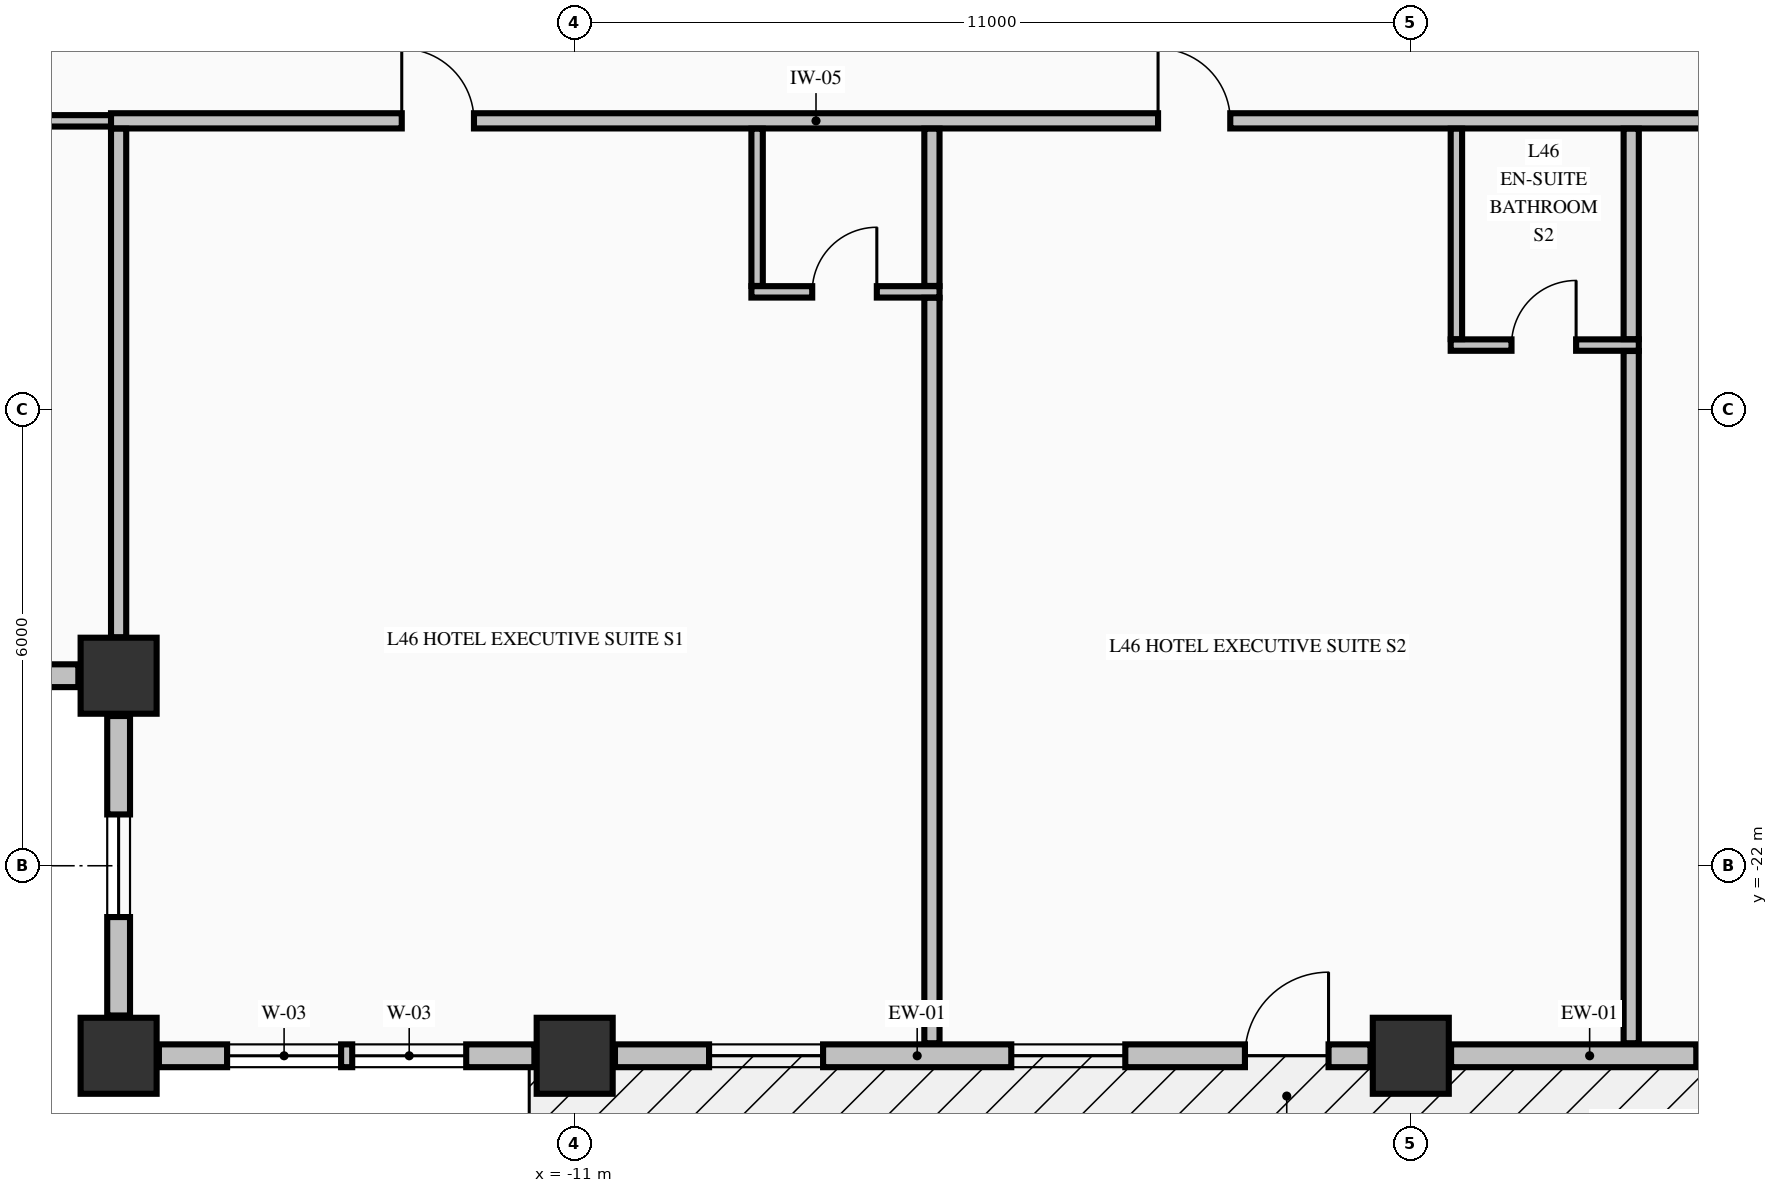
"""IFC4 building model, lengths in metres.
Left out: names, types, materials, properties, quantities, classifications, styles, units other than length and angle.
Written with IfcOpenShell. Run it as: python <this file> out.ifc"""

import sys

from ifc_helpers import new_model, si_unit, direction, frame, frame_2d, origin, origin_2d, place, context, subcontext, project, spatial, rectangle, extrude, element, fill, save


model = new_model("IFC4")
c1 = context("Model", 3, precision=1e-05, world=origin(), true_north=direction((0.0, 1.0)))
c2 = subcontext(c1, "Body", "Model", "MODEL_VIEW")
j1 = project(units=[si_unit("LENGTHUNIT", "METRE"), si_unit("PLANEANGLEUNIT", "RADIAN")], contexts=[c1])
p1 = place(None, origin())
s1 = spatial("IfcSite", under=j1, at=p1, CompositionType="ELEMENT")
p2 = place(p1, origin())
s2 = spatial("IfcBuilding", under=s1, at=p2, CompositionType="ELEMENT")
p3 = place(p2, frame((0.0, 0.0, 179.66)))
s3 = spatial("IfcBuildingStorey", under=s2, at=p3, CompositionType="ELEMENT", Elevation=179.66)
for number, where, z_axis, x_axis in (
    (1, (-17.0, -24.5, -0.25), (0.0, 0.0, 1.0), (1.0, 0.0, 0.0)),
    (2, (-11.0, -24.5, -0.25), (0.0, 0.0, 1.0), (1.0, 0.0, 0.0)),
    (3, (0.0, -24.5, -0.25), (0.0, 0.0, 1.0), (1.0, 0.0, 0.0)),
    (4, (-17.0, -19.5, -0.25), (0.0, 0.0, 1.0), (1.0, 0.0, 0.0)),
):
    element("IfcColumn", number, at=place(p3, frame(where, z_axis=z_axis, x_axis=x_axis)), inside=s3, PredefinedType="COLUMN", context=c2, shape_type="SweptSolid", body=[
        extrude(rectangle(XDim=1.0, YDim=1.0, at=origin_2d()), origin(), (0.0, 0.0, 1.0), 3.4),
    ])
p4 = place(p3, frame((-21.47, -19.5, 0.0), z_axis=(0.0, 0.0, 1.0), x_axis=(1.0, 0.0, 0.0)))
e5 = element("IfcWall", 5, at=p4, inside=s3, PredefinedType="STANDARD", context=c2, shape_type="SweptSolid", body=[
    extrude(rectangle(XDim=3.94, YDim=0.3, at=frame_2d((1.97, 0.0))), origin(), (0.0, 0.0, 1.0), 2.542),
])
p5 = place(p4, frame((1.295, 0.0, 0.68)))
e6 = element("IfcOpeningElement", 6, at=p5, cuts=e5, PredefinedType="OPENING", context=c2, shape_type="SweptSolid", body=[
    extrude(rectangle(XDim=1.35, YDim=1.42, at=frame_2d((0.675, 0.71))), frame((0.0, 0.16, 0.0), z_axis=(0.0, -1.0, 0.0), x_axis=(1.0, 0.0, 0.0)), (0.0, 0.0, 1.0), 0.32),
])
p6 = place(p3, frame((-17.0, -20.03, 0.0), z_axis=(0.0, 0.0, 1.0), x_axis=(0.0, -1.0, 0.0)))
e7 = element("IfcWall", 7, at=p6, inside=s3, PredefinedType="STANDARD", context=c2, shape_type="SweptSolid", body=[
    extrude(rectangle(XDim=3.94, YDim=0.3, at=frame_2d((1.97, 0.0))), origin(), (0.0, 0.0, 1.0), 2.542),
])
p7 = place(p6, frame((1.295, 0.0, 0.68)))
e8 = element("IfcOpeningElement", 8, at=p7, cuts=e7, PredefinedType="OPENING", context=c2, shape_type="SweptSolid", body=[
    extrude(rectangle(XDim=1.35, YDim=1.42, at=frame_2d((0.675, 0.71))), frame((0.0, 0.16, 0.0), z_axis=(0.0, -1.0, 0.0), x_axis=(1.0, 0.0, 0.0)), (0.0, 0.0, 1.0), 0.32),
])
p8 = place(p3, frame((-16.47, -24.5, 0.0), z_axis=(0.0, 0.0, 1.0), x_axis=(1.0, 0.0, 0.0)))
e9 = element("IfcWall", 9, at=p8, inside=s3, PredefinedType="STANDARD", context=c2, shape_type="SweptSolid", body=[
    extrude(rectangle(XDim=4.94, YDim=0.3, at=frame_2d((2.47, 0.0))), origin(), (0.0, 0.0, 1.0), 2.542),
])
p9 = place(p8, frame((0.897, 0.0, 0.72)))
e10 = element("IfcOpeningElement", 10, at=p9, cuts=e9, PredefinedType="OPENING", context=c2, shape_type="SweptSolid", body=[
    extrude(rectangle(XDim=1.5, YDim=1.6, at=frame_2d((0.75, 0.8))), frame((0.0, 0.16, 0.0), z_axis=(0.0, -1.0, 0.0), x_axis=(1.0, 0.0, 0.0)), (0.0, 0.0, 1.0), 0.32),
])
p10 = place(p8, frame((2.543, 0.0, 0.72)))
e11 = element("IfcOpeningElement", 11, at=p10, cuts=e9, PredefinedType="OPENING", context=c2, shape_type="SweptSolid", body=[
    extrude(rectangle(XDim=1.5, YDim=1.6, at=frame_2d((0.75, 0.8))), frame((0.0, 0.16, 0.0), z_axis=(0.0, -1.0, 0.0), x_axis=(1.0, 0.0, 0.0)), (0.0, 0.0, 1.0), 0.32),
])
p11 = place(p3, frame((-10.47, -24.5, 0.0), z_axis=(0.0, 0.0, 1.0), x_axis=(1.0, 0.0, 0.0)))
e12 = element("IfcWall", 12, at=p11, inside=s3, PredefinedType="STANDARD", context=c2, shape_type="SweptSolid", body=[
    extrude(rectangle(XDim=9.94, YDim=0.3, at=frame_2d((4.97, 0.0))), origin(), (0.0, 0.0, 1.0), 2.542),
])
p12 = place(p11, frame((8.288, 0.0, 0.0)))
e13 = element("IfcOpeningElement", 13, at=p12, cuts=e12, PredefinedType="OPENING", context=c2, shape_type="SweptSolid", body=[
    extrude(rectangle(XDim=1.1, YDim=2.15, at=frame_2d((0.55, 1.075))), frame((0.0, 0.16, 0.0), z_axis=(0.0, -1.0, 0.0), x_axis=(1.0, 0.0, 0.0)), (0.0, 0.0, 1.0), 0.32),
])
p13 = place(p11, frame((1.238, 0.0, 0.72)))
e14 = element("IfcOpeningElement", 14, at=p13, cuts=e12, PredefinedType="OPENING", context=c2, shape_type="SweptSolid", body=[
    extrude(rectangle(XDim=1.5, YDim=1.6, at=frame_2d((0.75, 0.8))), frame((0.0, 0.16, 0.0), z_axis=(0.0, -1.0, 0.0), x_axis=(1.0, 0.0, 0.0)), (0.0, 0.0, 1.0), 0.32),
])
p14 = place(p11, frame((5.214, 0.0, 0.72)))
e15 = element("IfcOpeningElement", 15, at=p14, cuts=e12, PredefinedType="OPENING", context=c2, shape_type="SweptSolid", body=[
    extrude(rectangle(XDim=1.5, YDim=1.6, at=frame_2d((0.75, 0.8))), frame((0.0, 0.16, 0.0), z_axis=(0.0, -1.0, 0.0), x_axis=(1.0, 0.0, 0.0)), (0.0, 0.0, 1.0), 0.32),
])
p15 = place(p3, frame((0.53, -24.5, 0.0), z_axis=(0.0, 0.0, 1.0), x_axis=(1.0, 0.0, 0.0)))
e16 = element("IfcWall", 16, at=p15, inside=s3, PredefinedType="STANDARD", context=c2, shape_type="SweptSolid", body=[
    extrude(rectangle(XDim=9.94, YDim=0.3, at=frame_2d((4.97, 0.0))), origin(), (0.0, 0.0, 1.0), 2.542),
])
p16 = place(p15, frame((3.226, 0.0, 0.72)))
e17 = element("IfcOpeningElement", 17, at=p16, cuts=e16, PredefinedType="OPENING", context=c2, shape_type="SweptSolid", body=[
    extrude(rectangle(XDim=1.5, YDim=1.6, at=frame_2d((0.75, 0.8))), frame((0.0, 0.16, 0.0), z_axis=(0.0, -1.0, 0.0), x_axis=(1.0, 0.0, 0.0)), (0.0, 0.0, 1.0), 0.32),
])
p17 = place(p15, frame((5.214, 0.0, 0.72)))
e18 = element("IfcOpeningElement", 18, at=p17, cuts=e16, PredefinedType="OPENING", context=c2, shape_type="SweptSolid", body=[
    extrude(rectangle(XDim=1.5, YDim=1.6, at=frame_2d((0.75, 0.8))), frame((0.0, 0.16, 0.0), z_axis=(0.0, -1.0, 0.0), x_axis=(1.0, 0.0, 0.0)), (0.0, 0.0, 1.0), 0.32),
])
p18 = place(p15, frame((7.202, 0.0, 0.72)))
e19 = element("IfcOpeningElement", 19, at=p18, cuts=e16, PredefinedType="OPENING", context=c2, shape_type="SweptSolid", body=[
    extrude(rectangle(XDim=1.5, YDim=1.6, at=frame_2d((0.75, 0.8))), frame((0.0, 0.16, 0.0), z_axis=(0.0, -1.0, 0.0), x_axis=(1.0, 0.0, 0.0)), (0.0, 0.0, 1.0), 0.32),
])
p19 = place(p3, frame((0.525, -15.15, 0.0), z_axis=(0.0, 0.0, 1.0), x_axis=(1.0, 0.0, 0.0)))
e20 = element("IfcWall", 20, at=p19, inside=s3, PredefinedType="PARTITIONING", context=c2, shape_type="SweptSolid", body=[
    extrude(rectangle(XDim=2.475, YDim=0.15, at=frame_2d((1.238, 0.0))), origin(), (0.0, 0.0, 1.0), 3.15),
])
p20 = place(p19, frame((0.8, 0.0, 0.0)))
e21 = element("IfcOpeningElement", 21, at=p20, cuts=e20, PredefinedType="OPENING", context=c2, shape_type="SweptSolid", body=[
    extrude(rectangle(XDim=0.85, YDim=2.1, at=frame_2d((0.425, 1.05))), frame((0.0, 0.085, 0.0), z_axis=(0.0, -1.0, 0.0), x_axis=(1.0, 0.0, 0.0)), (0.0, 0.0, 1.0), 0.17),
])
p21 = place(p3, frame((-8.675, -14.45, 0.0), z_axis=(0.0, 0.0, 1.0), x_axis=(1.0, 0.0, 0.0)))
e22 = element("IfcWall", 22, at=p21, inside=s3, PredefinedType="PARTITIONING", context=c2, shape_type="SweptSolid", body=[
    extrude(rectangle(XDim=2.475, YDim=0.15, at=frame_2d((1.238, 0.0))), origin(), (0.0, 0.0, 1.0), 3.15),
])
p22 = place(p21, frame((0.8, 0.0, 0.0)))
e23 = element("IfcOpeningElement", 23, at=p22, cuts=e22, PredefinedType="OPENING", context=c2, shape_type="SweptSolid", body=[
    extrude(rectangle(XDim=0.85, YDim=2.1, at=frame_2d((0.425, 1.05))), frame((0.0, 0.085, 0.0), z_axis=(0.0, -1.0, 0.0), x_axis=(1.0, 0.0, 0.0)), (0.0, 0.0, 1.0), 0.17),
])
p23 = place(p3, frame((-20.075, -12.2, 0.0), z_axis=(0.0, 0.0, 1.0), x_axis=(1.0, 0.0, 0.0)))
e24 = element("IfcWall", 24, at=p23, inside=s3, PredefinedType="PARTITIONING", context=c2, shape_type="SweptSolid", body=[
    extrude(rectangle(XDim=3.175, YDim=0.15, at=frame_2d((1.587, 0.0))), origin(), (0.0, 0.0, 1.0), 3.15),
])
p24 = place(p3, frame((-17.1, -12.2, 0.0), z_axis=(0.0, 0.0, 1.0), x_axis=(1.0, 0.0, 0.0)))
e25 = element("IfcWall", 25, at=p24, inside=s3, PredefinedType="PARTITIONING", context=c2, shape_type="SweptSolid", body=[
    extrude(rectangle(XDim=39.2, YDim=0.2, at=frame_2d((19.6, 0.0))), origin(), (0.0, 0.0, 1.0), 3.15),
])
p25 = place(p24, frame((3.825, 0.0, 0.0)))
e26 = element("IfcOpeningElement", 26, at=p25, cuts=e25, PredefinedType="OPENING", context=c2, shape_type="SweptSolid", body=[
    extrude(rectangle(XDim=0.95, YDim=2.15, at=frame_2d((0.475, 1.075))), frame((0.0, 0.11, 0.0), z_axis=(0.0, -1.0, 0.0), x_axis=(1.0, 0.0, 0.0)), (0.0, 0.0, 1.0), 0.22),
])
p26 = place(p24, frame((13.775, 0.0, 0.0)))
e27 = element("IfcOpeningElement", 27, at=p26, cuts=e25, PredefinedType="OPENING", context=c2, shape_type="SweptSolid", body=[
    extrude(rectangle(XDim=0.95, YDim=2.15, at=frame_2d((0.475, 1.075))), frame((0.0, 0.11, 0.0), z_axis=(0.0, -1.0, 0.0), x_axis=(1.0, 0.0, 0.0)), (0.0, 0.0, 1.0), 0.22),
])
p27 = place(p24, frame((21.775, 0.0, 0.0)))
e28 = element("IfcOpeningElement", 28, at=p27, cuts=e25, PredefinedType="OPENING", context=c2, shape_type="SweptSolid", body=[
    extrude(rectangle(XDim=0.95, YDim=2.15, at=frame_2d((0.475, 1.075))), frame((0.0, 0.11, 0.0), z_axis=(0.0, -1.0, 0.0), x_axis=(1.0, 0.0, 0.0)), (0.0, 0.0, 1.0), 0.22),
])
p28 = place(p24, frame((27.975, 0.0, 0.0)))
e29 = element("IfcOpeningElement", 29, at=p28, cuts=e25, PredefinedType="OPENING", context=c2, shape_type="SweptSolid", body=[
    extrude(rectangle(XDim=0.95, YDim=2.15, at=frame_2d((0.475, 1.075))), frame((0.0, 0.11, 0.0), z_axis=(0.0, -1.0, 0.0), x_axis=(1.0, 0.0, 0.0)), (0.0, 0.0, 1.0), 0.22),
])
p29 = place(p24, frame((34.325, 0.0, 0.0)))
e30 = element("IfcOpeningElement", 30, at=p29, cuts=e25, PredefinedType="OPENING", context=c2, shape_type="SweptSolid", body=[
    extrude(rectangle(XDim=0.95, YDim=2.15, at=frame_2d((0.475, 1.075))), frame((0.0, 0.11, 0.0), z_axis=(0.0, -1.0, 0.0), x_axis=(1.0, 0.0, 0.0)), (0.0, 0.0, 1.0), 0.22),
])
p30 = place(p3, frame((-17.0, -18.994, 0.0), z_axis=(0.0, 0.0, 1.0), x_axis=(0.0, 1.0, 0.0)))
e31 = element("IfcWall", 31, at=p30, inside=s3, PredefinedType="PARTITIONING", context=c2, shape_type="SweptSolid", body=[
    extrude(rectangle(XDim=6.691, YDim=0.2, at=frame_2d((3.345, 0.0))), origin(), (0.0, 0.0, 1.0), 3.15),
])
p31 = place(p3, frame((-8.6, -14.372, 0.0), z_axis=(0.0, 0.0, 1.0), x_axis=(0.0, 1.0, 0.0)))
e32 = element("IfcWall", 32, at=p31, inside=s3, PredefinedType="PARTITIONING", context=c2, shape_type="SweptSolid", body=[
    extrude(rectangle(XDim=2.069, YDim=0.15, at=frame_2d((1.035, 0.0))), origin(), (0.0, 0.0, 1.0), 3.15),
])
p32 = place(p3, frame((-6.3, -24.335, 0.0), z_axis=(0.0, 0.0, 1.0), x_axis=(0.0, 1.0, 0.0)))
e33 = element("IfcWall", 33, at=p32, inside=s3, PredefinedType="PARTITIONING", context=c2, shape_type="SweptSolid", body=[
    extrude(rectangle(XDim=9.807, YDim=0.2, at=frame_2d((4.903, 0.0))), origin(), (0.0, 0.0, 1.0), 3.15),
])
p33 = place(p3, frame((-6.3, -14.372, 0.0), z_axis=(0.0, 0.0, 1.0), x_axis=(0.0, 1.0, 0.0)))
e34 = element("IfcWall", 34, at=p33, inside=s3, PredefinedType="PARTITIONING", context=c2, shape_type="SweptSolid", body=[
    extrude(rectangle(XDim=2.069, YDim=0.2, at=frame_2d((1.035, 0.0))), origin(), (0.0, 0.0, 1.0), 3.15),
])
p34 = place(p3, frame((0.6, -15.072, 0.0), z_axis=(0.0, 0.0, 1.0), x_axis=(0.0, 1.0, 0.0)))
e35 = element("IfcWall", 35, at=p34, inside=s3, PredefinedType="PARTITIONING", context=c2, shape_type="SweptSolid", body=[
    extrude(rectangle(XDim=2.769, YDim=0.15, at=frame_2d((1.385, 0.0))), origin(), (0.0, 0.0, 1.0), 3.15),
])
p35 = place(p3, frame((2.9, -24.335, 0.0), z_axis=(0.0, 0.0, 1.0), x_axis=(0.0, 1.0, 0.0)))
e36 = element("IfcWall", 36, at=p35, inside=s3, PredefinedType="PARTITIONING", context=c2, shape_type="SweptSolid", body=[
    extrude(rectangle(XDim=9.107, YDim=0.2, at=frame_2d((4.553, 0.0))), origin(), (0.0, 0.0, 1.0), 3.15),
])
p36 = place(p3, frame((2.9, -15.072, 0.0), z_axis=(0.0, 0.0, 1.0), x_axis=(0.0, 1.0, 0.0)))
e37 = element("IfcWall", 37, at=p36, inside=s3, PredefinedType="PARTITIONING", context=c2, shape_type="SweptSolid", body=[
    extrude(rectangle(XDim=2.769, YDim=0.2, at=frame_2d((1.385, 0.0))), origin(), (0.0, 0.0, 1.0), 3.15),
])
p37 = place(p7, origin())
e38 = element("IfcWindow", 38, at=p37, inside=s3, PartitioningType="SINGLE_PANEL", PredefinedType="WINDOW", context=c2, shape_type="SweptSolid", body=[
    extrude(rectangle(XDim=1.35, YDim=1.42, at=frame_2d((0.675, 0.71))), frame((0.0, 0.03, 0.0), z_axis=(0.0, -1.0, 0.0), x_axis=(1.0, 0.0, 0.0)), (0.0, 0.0, 1.0), 0.06),
])
fill(e8, e38)
p38 = place(p9, origin())
e39 = element("IfcWindow", 39, at=p38, inside=s3, PartitioningType="SINGLE_PANEL", PredefinedType="WINDOW", context=c2, shape_type="SweptSolid", body=[
    extrude(rectangle(XDim=1.5, YDim=1.6, at=frame_2d((0.75, 0.8))), frame((0.0, 0.03, 0.0), z_axis=(0.0, -1.0, 0.0), x_axis=(1.0, 0.0, 0.0)), (0.0, 0.0, 1.0), 0.06),
])
fill(e10, e39)
p39 = place(p10, origin())
e40 = element("IfcWindow", 40, at=p39, inside=s3, PartitioningType="SINGLE_PANEL", PredefinedType="WINDOW", context=c2, shape_type="SweptSolid", body=[
    extrude(rectangle(XDim=1.5, YDim=1.6, at=frame_2d((0.75, 0.8))), frame((0.0, 0.03, 0.0), z_axis=(0.0, -1.0, 0.0), x_axis=(1.0, 0.0, 0.0)), (0.0, 0.0, 1.0), 0.06),
])
fill(e11, e40)
p40 = place(p12, origin())
e41 = element("IfcDoor", 41, at=p40, inside=s3, OperationType="SINGLE_SWING_RIGHT", PredefinedType="DOOR", context=c2, shape_type="SweptSolid", body=[
    extrude(rectangle(XDim=1.1, YDim=2.15, at=frame_2d((0.55, 1.075))), frame((0.0, 0.025, 0.0), z_axis=(0.0, -1.0, 0.0), x_axis=(1.0, 0.0, 0.0)), (0.0, 0.0, 1.0), 0.05),
])
fill(e13, e41)
p41 = place(p13, origin())
e42 = element("IfcWindow", 42, at=p41, inside=s3, PartitioningType="SINGLE_PANEL", PredefinedType="WINDOW", context=c2, shape_type="SweptSolid", body=[
    extrude(rectangle(XDim=1.5, YDim=1.6, at=frame_2d((0.75, 0.8))), frame((0.0, 0.03, 0.0), z_axis=(0.0, -1.0, 0.0), x_axis=(1.0, 0.0, 0.0)), (0.0, 0.0, 1.0), 0.06),
])
fill(e14, e42)
p42 = place(p14, origin())
e43 = element("IfcWindow", 43, at=p42, inside=s3, PartitioningType="SINGLE_PANEL", PredefinedType="WINDOW", context=c2, shape_type="SweptSolid", body=[
    extrude(rectangle(XDim=1.5, YDim=1.6, at=frame_2d((0.75, 0.8))), frame((0.0, 0.03, 0.0), z_axis=(0.0, -1.0, 0.0), x_axis=(1.0, 0.0, 0.0)), (0.0, 0.0, 1.0), 0.06),
])
fill(e15, e43)
p43 = place(p16, origin())
e44 = element("IfcWindow", 44, at=p43, inside=s3, PartitioningType="SINGLE_PANEL", PredefinedType="WINDOW", context=c2, shape_type="SweptSolid", body=[
    extrude(rectangle(XDim=1.5, YDim=1.6, at=frame_2d((0.75, 0.8))), frame((0.0, 0.03, 0.0), z_axis=(0.0, -1.0, 0.0), x_axis=(1.0, 0.0, 0.0)), (0.0, 0.0, 1.0), 0.06),
])
fill(e17, e44)
p44 = place(p25, origin())
e45 = element("IfcDoor", 45, at=p44, inside=s3, OperationType="SINGLE_SWING_LEFT", PredefinedType="DOOR", context=c2, shape_type="SweptSolid", body=[
    extrude(rectangle(XDim=0.95, YDim=2.15, at=frame_2d((0.475, 1.075))), frame((0.0, 0.025, 0.0), z_axis=(0.0, -1.0, 0.0), x_axis=(1.0, 0.0, 0.0)), (0.0, 0.0, 1.0), 0.05),
])
fill(e26, e45)
p45 = place(p22, origin())
e46 = element("IfcDoor", 46, at=p45, inside=s3, OperationType="SINGLE_SWING_RIGHT", PredefinedType="DOOR", context=c2, shape_type="SweptSolid", body=[
    extrude(rectangle(XDim=0.85, YDim=2.1, at=frame_2d((0.425, 1.05))), frame((0.0, 0.025, 0.0), z_axis=(0.0, -1.0, 0.0), x_axis=(1.0, 0.0, 0.0)), (0.0, 0.0, 1.0), 0.05),
])
fill(e23, e46)
p46 = place(p26, origin())
e47 = element("IfcDoor", 47, at=p46, inside=s3, OperationType="SINGLE_SWING_LEFT", PredefinedType="DOOR", context=c2, shape_type="SweptSolid", body=[
    extrude(rectangle(XDim=0.95, YDim=2.15, at=frame_2d((0.475, 1.075))), frame((0.0, 0.025, 0.0), z_axis=(0.0, -1.0, 0.0), x_axis=(1.0, 0.0, 0.0)), (0.0, 0.0, 1.0), 0.05),
])
fill(e27, e47)
p47 = place(p20, origin())
e48 = element("IfcDoor", 48, at=p47, inside=s3, OperationType="SINGLE_SWING_RIGHT", PredefinedType="DOOR", context=c2, shape_type="SweptSolid", body=[
    extrude(rectangle(XDim=0.85, YDim=2.1, at=frame_2d((0.425, 1.05))), frame((0.0, 0.025, 0.0), z_axis=(0.0, -1.0, 0.0), x_axis=(1.0, 0.0, 0.0)), (0.0, 0.0, 1.0), 0.05),
])
fill(e21, e48)
save(model, sys.argv[1])
